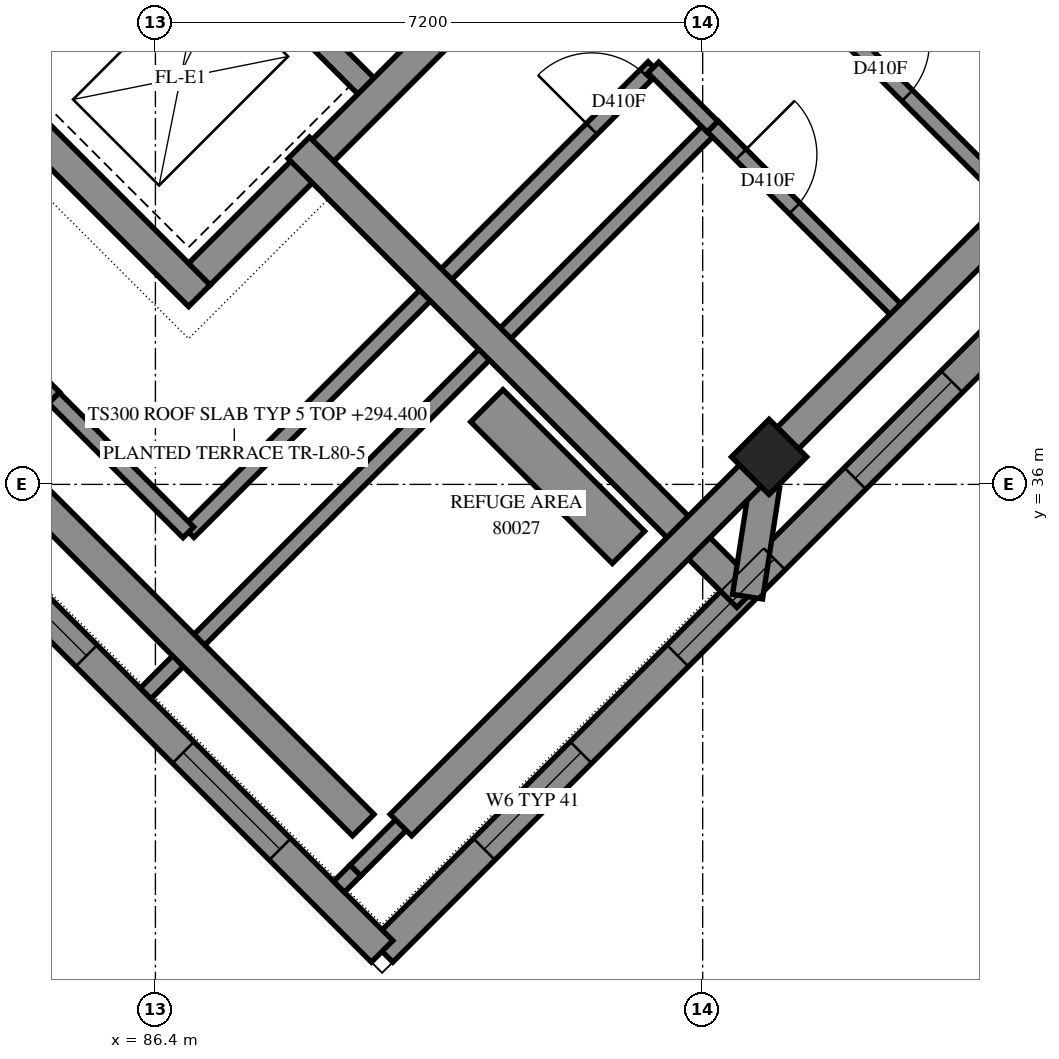
"""IFC4 building model, lengths in metres.
Left out: names, types, materials, properties, quantities, classifications, styles, units other than length and angle.
Written with IfcOpenShell. Run it as: python <this file> out.ifc"""

import sys

from ifc_helpers import new_model, si_unit, direction, frame, frame_2d, origin, origin_2d, place, context, subcontext, project, spatial, polyline, rectangle, outline, extrude, element, fill, save


model = new_model("IFC4")
c1 = context("Model", 3, precision=1e-05, world=origin(), true_north=direction((0.0, 1.0)))
c2 = subcontext(c1, "Body", "Model", "MODEL_VIEW")
j1 = project(units=[si_unit("LENGTHUNIT", "METRE"), si_unit("PLANEANGLEUNIT", "RADIAN")], contexts=[c1])
p1 = place(None, origin())
s1 = spatial("IfcSite", under=j1, at=p1, CompositionType="ELEMENT")
p2 = place(p1, origin())
s2 = spatial("IfcBuilding", under=s1, at=p2, CompositionType="ELEMENT")
p3 = place(p2, frame((0.0, 0.0, 294.4)))
s3 = spatial("IfcBuildingStorey", under=s2, at=p3, CompositionType="ELEMENT", Elevation=294.4)
p4 = place(p3, frame((94.474, 36.362, 0.0), z_axis=(0.0, 0.0, 1.0), x_axis=(0.7071067812, -0.7071067812, 0.0)))
e1 = element("IfcColumn", 1, at=p4, inside=s3, PredefinedType="COLUMN", context=c2, shape_type="SweptSolid", body=[
    extrude(rectangle(XDim=0.7, YDim=0.7, at=origin_2d()), origin(), (0.0, 0.0, 1.0), 3.5),
])
p5 = place(p3, frame((76.23, 49.231, -0.3), z_axis=(0.0, 0.0, 1.0), x_axis=(0.7071034917, -0.7071100706, 0.0)))
e2 = element("IfcWall", 2, at=p5, inside=s3, PredefinedType="SHEAR", context=c2, shape_type="SweptSolid", body=[
    extrude(outline(polyline([(0.0, 0.0), (15.2, 0.0), (15.2, 3.1), (0.0, 3.1), (0.0, 0.0)])), frame((0.0, 0.2, 0.0), z_axis=(0.0, -1.0, 0.0), x_axis=(1.0, 0.0, 0.0)), (0.0, 0.0, 1.0), 0.4),
])
p6 = place(p3, frame((86.978, 38.766, -0.3), z_axis=(0.0, 0.0, 1.0), x_axis=(0.7071067812, 0.7071067812, 0.0)))
e3 = element("IfcWall", 3, at=p6, inside=s3, PredefinedType="SHEAR", context=c2, shape_type="SweptSolid", body=[
    extrude(outline(polyline([(0.0, 0.0), (14.4, 0.0), (14.4, 3.1), (0.0, 3.1), (0.0, 0.0)])), frame((0.0, 0.2, 0.0), z_axis=(0.0, -1.0, 0.0), x_axis=(1.0, 0.0, 0.0)), (0.0, 0.0, 1.0), 0.4),
])
p7 = place(p6, frame((4.55, 0.0, 0.3)))
e4 = element("IfcOpeningElement", 4, at=p7, cuts=e3, PredefinedType="OPENING", context=c2, shape_type="SweptSolid", body=[
    extrude(rectangle(XDim=1.1, YDim=2.1, at=frame_2d((0.55, 1.05))), frame((0.0, 0.21, 0.0), z_axis=(0.0, -1.0, 0.0), x_axis=(1.0, 0.0, 0.0)), (0.0, 0.0, 1.0), 0.42),
])
p8 = place(p6, frame((11.35, 0.0, 0.3)))
e5 = element("IfcOpeningElement", 5, at=p8, cuts=e3, PredefinedType="OPENING", context=c2, shape_type="SweptSolid", body=[
    extrude(rectangle(XDim=1.1, YDim=2.1, at=frame_2d((0.55, 1.05))), frame((0.0, 0.21, 0.0), z_axis=(0.0, -1.0, 0.0), x_axis=(1.0, 0.0, 0.0)), (0.0, 0.0, 1.0), 0.42),
])
p9 = place(p3, frame((84.291, 41.453, 0.0), z_axis=(0.0, 0.0, 1.0), x_axis=(0.7071067812, 0.7071067812, 0.0)))
e6 = element("IfcWall", 6, at=p9, inside=s3, PredefinedType="SOLIDWALL", context=c2, shape_type="SweptSolid", body=[
    extrude(outline(polyline([(0.0, 0.0), (3.3, 0.0), (3.3, 3.5), (0.0, 3.5), (0.0, 0.0)])), frame((0.0, 0.15, 0.0), z_axis=(0.0, -1.0, 0.0), x_axis=(1.0, 0.0, 0.0)), (0.0, 0.0, 1.0), 0.3),
])
p10 = place(p3, frame((78.988, 51.423, 0.0), z_axis=(0.0, 0.0, 1.0), x_axis=(0.7071067812, -0.7071067812, 0.0)))
e7 = element("IfcWall", 7, at=p10, inside=s3, PredefinedType="SOLIDWALL", context=c2, shape_type="SweptSolid", body=[
    extrude(outline(polyline([(0.0, 0.0), (14.4, 0.0), (14.4, 3.5), (0.0, 3.5), (0.0, 0.0)])), frame((0.0, 0.15, 0.0), z_axis=(0.0, -1.0, 0.0), x_axis=(1.0, 0.0, 0.0)), (0.0, 0.0, 1.0), 0.3),
])
p11 = place(p10, frame((12.05, 0.0, 0.0)))
e8 = element("IfcOpeningElement", 8, at=p11, cuts=e7, PredefinedType="OPENING", context=c2, shape_type="SweptSolid", body=[
    extrude(rectangle(XDim=1.1, YDim=2.1, at=frame_2d((0.55, 1.05))), frame((0.0, 0.16, 0.0), z_axis=(0.0, -1.0, 0.0), x_axis=(1.0, 0.0, 0.0)), (0.0, 0.0, 1.0), 0.32),
])
p12 = place(p3, frame((89.382, 29.856, 0.0), z_axis=(0.0, 0.0, 1.0), x_axis=(0.7071094407, 0.7071041216, 0.0)))
e9 = element("IfcWall", 9, at=p12, inside=s3, PredefinedType="SOLIDWALL", context=c2, shape_type="SweptSolid", body=[
    extrude(outline(polyline([(-0.2, -0.2), (19.0, -0.2), (18.6, 0.2), (0.2, 0.2), (-0.2, -0.2)])), origin(), (0.0, 0.0, 1.0), 3.5),
])
p13 = place(p12, frame((1.9, 0.0, 0.7)))
e10 = element("IfcOpeningElement", 10, at=p13, cuts=e9, PredefinedType="OPENING", context=c2, shape_type="SweptSolid", body=[
    extrude(rectangle(XDim=1.8, YDim=2.2, at=frame_2d((0.9, 1.1))), frame((0.0, 0.21, 0.0), z_axis=(0.0, -1.0, 0.0), x_axis=(1.0, 0.0, 0.0)), (0.0, 0.0, 1.0), 0.42),
])
p14 = place(p12, frame((5.5, 0.0, 0.7)))
e11 = element("IfcOpeningElement", 11, at=p14, cuts=e9, PredefinedType="OPENING", context=c2, shape_type="SweptSolid", body=[
    extrude(rectangle(XDim=1.8, YDim=2.2, at=frame_2d((0.9, 1.1))), frame((0.0, 0.21, 0.0), z_axis=(0.0, -1.0, 0.0), x_axis=(1.0, 0.0, 0.0)), (0.0, 0.0, 1.0), 0.42),
])
p15 = place(p12, frame((8.8, 0.0, 0.7)))
e12 = element("IfcOpeningElement", 12, at=p15, cuts=e9, PredefinedType="OPENING", context=c2, shape_type="SweptSolid", body=[
    extrude(rectangle(XDim=1.8, YDim=2.2, at=frame_2d((0.9, 1.1))), frame((0.0, 0.21, 0.0), z_axis=(0.0, -1.0, 0.0), x_axis=(1.0, 0.0, 0.0)), (0.0, 0.0, 1.0), 0.42),
])
p16 = place(p12, frame((12.95, 0.0, 0.7)))
e13 = element("IfcOpeningElement", 13, at=p16, cuts=e9, PredefinedType="OPENING", context=c2, shape_type="SweptSolid", body=[
    extrude(rectangle(XDim=1.8, YDim=2.2, at=frame_2d((0.9, 1.1))), frame((0.0, 0.21, 0.0), z_axis=(0.0, -1.0, 0.0), x_axis=(1.0, 0.0, 0.0)), (0.0, 0.0, 1.0), 0.42),
])
p17 = place(p12, frame((16.0, 0.0, 0.7)))
e14 = element("IfcOpeningElement", 14, at=p17, cuts=e9, PredefinedType="OPENING", context=c2, shape_type="SweptSolid", body=[
    extrude(rectangle(XDim=1.8, YDim=2.2, at=frame_2d((0.9, 1.1))), frame((0.0, 0.21, 0.0), z_axis=(0.0, -1.0, 0.0), x_axis=(1.0, 0.0, 0.0)), (0.0, 0.0, 1.0), 0.42),
])
p18 = place(p3, frame((77.039, 42.2, 0.0), z_axis=(0.0, 0.0, 1.0), x_axis=(0.7071067812, -0.7071067812, 0.0)))
e15 = element("IfcWall", 15, at=p18, inside=s3, PredefinedType="SOLIDWALL", context=c2, shape_type="SweptSolid", body=[
    extrude(outline(polyline([(0.083, -0.2), (17.656, -0.2), (17.256, 0.2), (-0.083, 0.2), (0.083, -0.2)])), origin(), (0.0, 0.0, 1.0), 3.5),
])
p19 = place(p18, frame((2.857, 0.0, 0.7)))
e16 = element("IfcOpeningElement", 16, at=p19, cuts=e15, PredefinedType="OPENING", context=c2, shape_type="SweptSolid", body=[
    extrude(rectangle(XDim=1.8, YDim=2.2, at=frame_2d((0.9, 1.1))), frame((0.0, 0.21, 0.0), z_axis=(0.0, -1.0, 0.0), x_axis=(1.0, 0.0, 0.0)), (0.0, 0.0, 1.0), 0.42),
])
p20 = place(p18, frame((6.556, 0.0, 0.7)))
e17 = element("IfcOpeningElement", 17, at=p20, cuts=e15, PredefinedType="OPENING", context=c2, shape_type="SweptSolid", body=[
    extrude(rectangle(XDim=1.8, YDim=2.2, at=frame_2d((0.9, 1.1))), frame((0.0, 0.21, 0.0), z_axis=(0.0, -1.0, 0.0), x_axis=(1.0, 0.0, 0.0)), (0.0, 0.0, 1.0), 0.42),
])
p21 = place(p18, frame((10.156, 0.0, 0.7)))
e18 = element("IfcOpeningElement", 18, at=p21, cuts=e15, PredefinedType="OPENING", context=c2, shape_type="SweptSolid", body=[
    extrude(rectangle(XDim=1.8, YDim=2.2, at=frame_2d((0.9, 1.1))), frame((0.0, 0.21, 0.0), z_axis=(0.0, -1.0, 0.0), x_axis=(1.0, 0.0, 0.0)), (0.0, 0.0, 1.0), 0.42),
])
p22 = place(p18, frame((13.757, 0.0, 0.7)))
e19 = element("IfcOpeningElement", 19, at=p22, cuts=e15, PredefinedType="OPENING", context=c2, shape_type="SweptSolid", body=[
    extrude(rectangle(XDim=1.8, YDim=2.2, at=frame_2d((0.9, 1.1))), frame((0.0, 0.21, 0.0), z_axis=(0.0, -1.0, 0.0), x_axis=(1.0, 0.0, 0.0)), (0.0, 0.0, 1.0), 0.42),
])
p23 = place(p3, frame((93.908, 34.665, 0.0), z_axis=(0.0, 0.0, 1.0), x_axis=(-0.7071067812, 0.7071067812, 0.0)))
e20 = element("IfcWall", 20, at=p23, inside=s3, PredefinedType="PARAPET", context=c2, shape_type="SweptSolid", body=[
    extrude(outline(polyline([(0.0, -0.1), (7.3, -0.1), (7.3, 0.1), (0.0, 0.1), (0.0, -0.1)])), origin(), (0.0, 0.0, 1.0), 0.25),
])
p24 = place(p3, frame((86.836, 35.372, 0.0), z_axis=(0.0, 0.0, 1.0), x_axis=(0.7071067812, 0.7071067812, 0.0)))
e21 = element("IfcWall", 21, at=p24, inside=s3, PredefinedType="PARTITIONING", context=c2, shape_type="SweptSolid", body=[
    extrude(rectangle(XDim=8.651, YDim=0.2, at=frame_2d((4.325, 0.0))), origin(), (0.0, 0.0, 1.0), 3.5),
])
p25 = place(p24, frame((7.502, 0.0, 0.0)))
e22 = element("IfcOpeningElement", 22, at=p25, cuts=e21, PredefinedType="OPENING", context=c2, shape_type="SweptSolid", body=[
    extrude(rectangle(XDim=1.0, YDim=2.1, at=frame_2d((0.5, 1.05))), frame((0.0, 0.11, 0.0), z_axis=(0.0, -1.0, 0.0), x_axis=(1.0, 0.0, 0.0)), (0.0, 0.0, 1.0), 0.22),
])
p26 = place(p3, frame((89.031, 30.921, 0.0), z_axis=(0.0, 0.0, 1.0), x_axis=(0.7071067812, 0.7071067812, 0.0)))
e23 = element("IfcWall", 23, at=p26, inside=s3, PredefinedType="PARTITIONING", context=c2, shape_type="SweptSolid", body=[
    extrude(rectangle(XDim=8.191, YDim=0.2, at=frame_2d((4.096, 0.0))), origin(), (0.0, 0.0, 1.0), 3.5),
])
p27 = place(p3, frame((89.876, 36.858, 0.0), z_axis=(0.0, 0.0, 1.0), x_axis=(0.7071067812, 0.7071067812, 0.0)))
e24 = element("IfcWall", 24, at=p27, inside=s3, PredefinedType="PARTITIONING", context=c2, shape_type="SweptSolid", body=[
    extrude(rectangle(XDim=5.45, YDim=0.2, at=frame_2d((2.725, 0.0))), origin(), (0.0, 0.0, 1.0), 3.5),
])
p28 = place(p3, frame((94.434, 42.971, 0.0), z_axis=(0.0, 0.0, 1.0), x_axis=(0.7071067812, -0.7071067812, 0.0)))
e25 = element("IfcWall", 25, at=p28, inside=s3, PredefinedType="PARTITIONING", context=c2, shape_type="SweptSolid", body=[
    extrude(rectangle(XDim=4.701, YDim=0.2, at=frame_2d((2.35, 0.0))), origin(), (0.0, 0.0, 1.0), 3.5),
])
p29 = place(p28, frame((1.626, 0.0, 0.0)))
e26 = element("IfcOpeningElement", 26, at=p29, cuts=e25, PredefinedType="OPENING", context=c2, shape_type="SweptSolid", body=[
    extrude(rectangle(XDim=1.0, YDim=2.1, at=frame_2d((0.5, 1.05))), frame((0.0, 0.11, 0.0), z_axis=(0.0, -1.0, 0.0), x_axis=(1.0, 0.0, 0.0)), (0.0, 0.0, 1.0), 0.22),
])
p30 = place(p3, frame((93.732, 40.71, 0.0), z_axis=(0.0, 0.0, 1.0), x_axis=(0.7068288851, -0.7073845681, 0.0)))
e27 = element("IfcWall", 27, at=p30, inside=s3, PredefinedType="PARTITIONING", context=c2, shape_type="SweptSolid", body=[
    extrude(rectangle(XDim=3.599, YDim=0.2, at=frame_2d((1.8, 0.0))), origin(), (0.0, 0.0, 1.0), 3.5),
])
p31 = place(p30, frame((0.524, 0.0, 0.0)))
e28 = element("IfcOpeningElement", 28, at=p31, cuts=e27, PredefinedType="OPENING", context=c2, shape_type="SweptSolid", body=[
    extrude(rectangle(XDim=1.0, YDim=2.1, at=frame_2d((0.5, 1.05))), frame((0.0, 0.11, 0.0), z_axis=(0.0, -1.0, 0.0), x_axis=(1.0, 0.0, 0.0)), (0.0, 0.0, 1.0), 0.22),
])
p32 = place(p3, frame((82.526, 39.688, 0.0), z_axis=(0.0, 0.0, 1.0), x_axis=(0.7068288851, -0.7073845681, 0.0)))
e29 = element("IfcWall", 29, at=p32, inside=s3, PredefinedType="PARTITIONING", context=c2, shape_type="SweptSolid", body=[
    extrude(rectangle(XDim=3.599, YDim=0.2, at=frame_2d((1.8, 0.0))), origin(), (0.0, 0.0, 1.0), 3.5),
])
p33 = place(p3, frame((85.065, 37.137, 0.0), z_axis=(0.0, 0.0, 1.0), x_axis=(0.7071067812, -0.7071067812, 0.0)))
e30 = element("IfcWall", 30, at=p33, inside=s3, PredefinedType="PARTITIONING", context=c2, shape_type="SweptSolid", body=[
    extrude(rectangle(XDim=2.5, YDim=0.2, at=frame_2d((1.25, 0.0))), origin(), (0.0, 0.0, 1.0), 3.5),
])
p34 = place(p3, frame((96.275, 38.165, 0.0), z_axis=(0.0, 0.0, 1.0), x_axis=(0.7071067812, 0.7071067812, 0.0)))
e31 = element("IfcWall", 31, at=p34, inside=s3, PredefinedType="PARTITIONING", context=c2, shape_type="SweptSolid", body=[
    extrude(rectangle(XDim=2.102, YDim=0.2, at=frame_2d((1.051, 0.0))), origin(), (0.0, 0.0, 1.0), 3.0),
])
p35 = place(p3, frame((94.823, 36.713, 0.0), z_axis=(0.0, 0.0, 1.0), x_axis=(0.7071067812, 0.7071067812, 0.0)))
e32 = element("IfcWall", 32, at=p35, inside=s3, PredefinedType="PARTITIONING", context=c2, shape_type="SweptSolid", body=[
    extrude(rectangle(XDim=2.053, YDim=0.2, at=frame_2d((1.027, 0.0))), origin(), (0.0, 0.0, 1.0), 3.0),
])
p36 = place(p3, frame((92.951, 41.485, 0.0), z_axis=(0.0, 0.0, 1.0), x_axis=(0.7071067812, -0.7071067812, 0.0)))
e33 = element("IfcWall", 33, at=p36, inside=s3, PredefinedType="PARTITIONING", context=c2, shape_type="SweptSolid", body=[
    extrude(rectangle(XDim=1.1, YDim=0.2, at=frame_2d((0.55, 0.0))), origin(), (0.0, 0.0, 1.0), 3.5),
])
p37 = place(p3, frame((92.624, 35.171, 0.0), z_axis=(0.0, 0.0, 1.0), x_axis=(-0.7071067812, 0.7071067812, 0.0)))
e34 = element("IfcWall", 34, at=p37, inside=s3, PredefinedType="SOLIDWALL", context=c2, shape_type="SweptSolid", body=[
    extrude(outline(polyline([(0.0, -0.3), (2.635, -0.3), (2.635, 0.3), (0.0, 0.3), (0.0, -0.3)])), origin(), (0.0, 0.0, 1.0), 0.65),
])
p38 = place(p3, frame((86.272, 33.25, 0.0), z_axis=(0.0, 0.0, 1.0), x_axis=(0.7073028348, 0.7069106732, 0.0)))
e35 = element("IfcWall", 35, at=p38, inside=s3, PredefinedType="PARTITIONING", context=c2, shape_type="SweptSolid", body=[
    extrude(outline(polyline([(0.0, -0.1), (5.1, -0.1), (5.1, 0.1), (0.0, 0.1), (0.0, -0.1)])), origin(), (0.0, 0.0, 1.0), 3.5),
])
p39 = place(p3, frame((88.816, 30.706, 0.0), z_axis=(0.0, 0.0, 1.0), x_axis=(0.7071067812, 0.7071067812, 0.0)))
e36 = element("IfcWall", 36, at=p39, inside=s3, PredefinedType="PARTITIONING", context=c2, shape_type="SweptSolid", body=[
    extrude(outline(polyline([(0.0, -0.1), (0.304, -0.1), (0.304, 0.1), (0.0, 0.1), (0.0, -0.1)])), origin(), (0.0, 0.0, 1.0), 3.5),
])
p40 = place(p13, origin())
e37 = element("IfcWindow", 37, at=p40, inside=s3, PartitioningType="SINGLE_PANEL", PredefinedType="WINDOW", context=c2, shape_type="SweptSolid", body=[
    extrude(rectangle(XDim=1.8, YDim=2.2, at=frame_2d((0.9, 1.1))), frame((0.0, 0.08, 0.0), z_axis=(0.0, -1.0, 0.0), x_axis=(1.0, 0.0, 0.0)), (0.0, 0.0, 1.0), 0.06),
])
fill(e10, e37)
p41 = place(p14, origin())
e38 = element("IfcWindow", 38, at=p41, inside=s3, PartitioningType="SINGLE_PANEL", PredefinedType="WINDOW", context=c2, shape_type="SweptSolid", body=[
    extrude(rectangle(XDim=1.8, YDim=2.2, at=frame_2d((0.9, 1.1))), frame((0.0, 0.08, 0.0), z_axis=(0.0, -1.0, 0.0), x_axis=(1.0, 0.0, 0.0)), (0.0, 0.0, 1.0), 0.06),
])
fill(e11, e38)
p42 = place(p15, origin())
e39 = element("IfcWindow", 39, at=p42, inside=s3, PartitioningType="SINGLE_PANEL", PredefinedType="WINDOW", context=c2, shape_type="SweptSolid", body=[
    extrude(rectangle(XDim=1.8, YDim=2.2, at=frame_2d((0.9, 1.1))), frame((0.0, 0.08, 0.0), z_axis=(0.0, -1.0, 0.0), x_axis=(1.0, 0.0, 0.0)), (0.0, 0.0, 1.0), 0.06),
])
fill(e12, e39)
p43 = place(p21, origin())
e40 = element("IfcWindow", 40, at=p43, inside=s3, PartitioningType="SINGLE_PANEL", PredefinedType="WINDOW", context=c2, shape_type="SweptSolid", body=[
    extrude(rectangle(XDim=1.8, YDim=2.2, at=frame_2d((0.9, 1.1))), frame((0.0, 0.08, 0.0), z_axis=(0.0, -1.0, 0.0), x_axis=(1.0, 0.0, 0.0)), (0.0, 0.0, 1.0), 0.06),
])
fill(e18, e40)
p44 = place(p22, origin())
e41 = element("IfcWindow", 41, at=p44, inside=s3, PartitioningType="SINGLE_PANEL", PredefinedType="WINDOW", context=c2, shape_type="SweptSolid", body=[
    extrude(rectangle(XDim=1.8, YDim=2.2, at=frame_2d((0.9, 1.1))), frame((0.0, 0.08, 0.0), z_axis=(0.0, -1.0, 0.0), x_axis=(1.0, 0.0, 0.0)), (0.0, 0.0, 1.0), 0.06),
])
fill(e19, e41)
p45 = place(p25, origin())
e42 = element("IfcDoor", 42, at=p45, inside=s3, OperationType="SINGLE_SWING_LEFT", PredefinedType="DOOR", context=c2, shape_type="SweptSolid", body=[
    extrude(rectangle(XDim=1.0, YDim=2.1, at=frame_2d((0.5, 1.05))), frame((0.0, 0.025, 0.0), z_axis=(0.0, -1.0, 0.0), x_axis=(1.0, 0.0, 0.0)), (0.0, 0.0, 1.0), 0.05),
])
fill(e22, e42)
p46 = place(p31, origin())
e43 = element("IfcDoor", 43, at=p46, inside=s3, OperationType="SINGLE_SWING_LEFT", PredefinedType="DOOR", context=c2, shape_type="SweptSolid", body=[
    extrude(rectangle(XDim=1.0, YDim=2.1, at=frame_2d((0.5, 1.05))), frame((0.0, 0.025, 0.0), z_axis=(0.0, -1.0, 0.0), x_axis=(1.0, 0.0, 0.0)), (0.0, 0.0, 1.0), 0.05),
])
fill(e28, e43)
p47 = place(p29, origin())
e44 = element("IfcDoor", 44, at=p47, inside=s3, OperationType="SINGLE_SWING_RIGHT", PredefinedType="DOOR", context=c2, shape_type="SweptSolid", body=[
    extrude(rectangle(XDim=1.0, YDim=2.1, at=frame_2d((0.5, 1.05))), frame((0.0, 0.025, 0.0), z_axis=(0.0, -1.0, 0.0), x_axis=(1.0, 0.0, 0.0)), (0.0, 0.0, 1.0), 0.05),
])
fill(e26, e44)
save(model, sys.argv[1])
